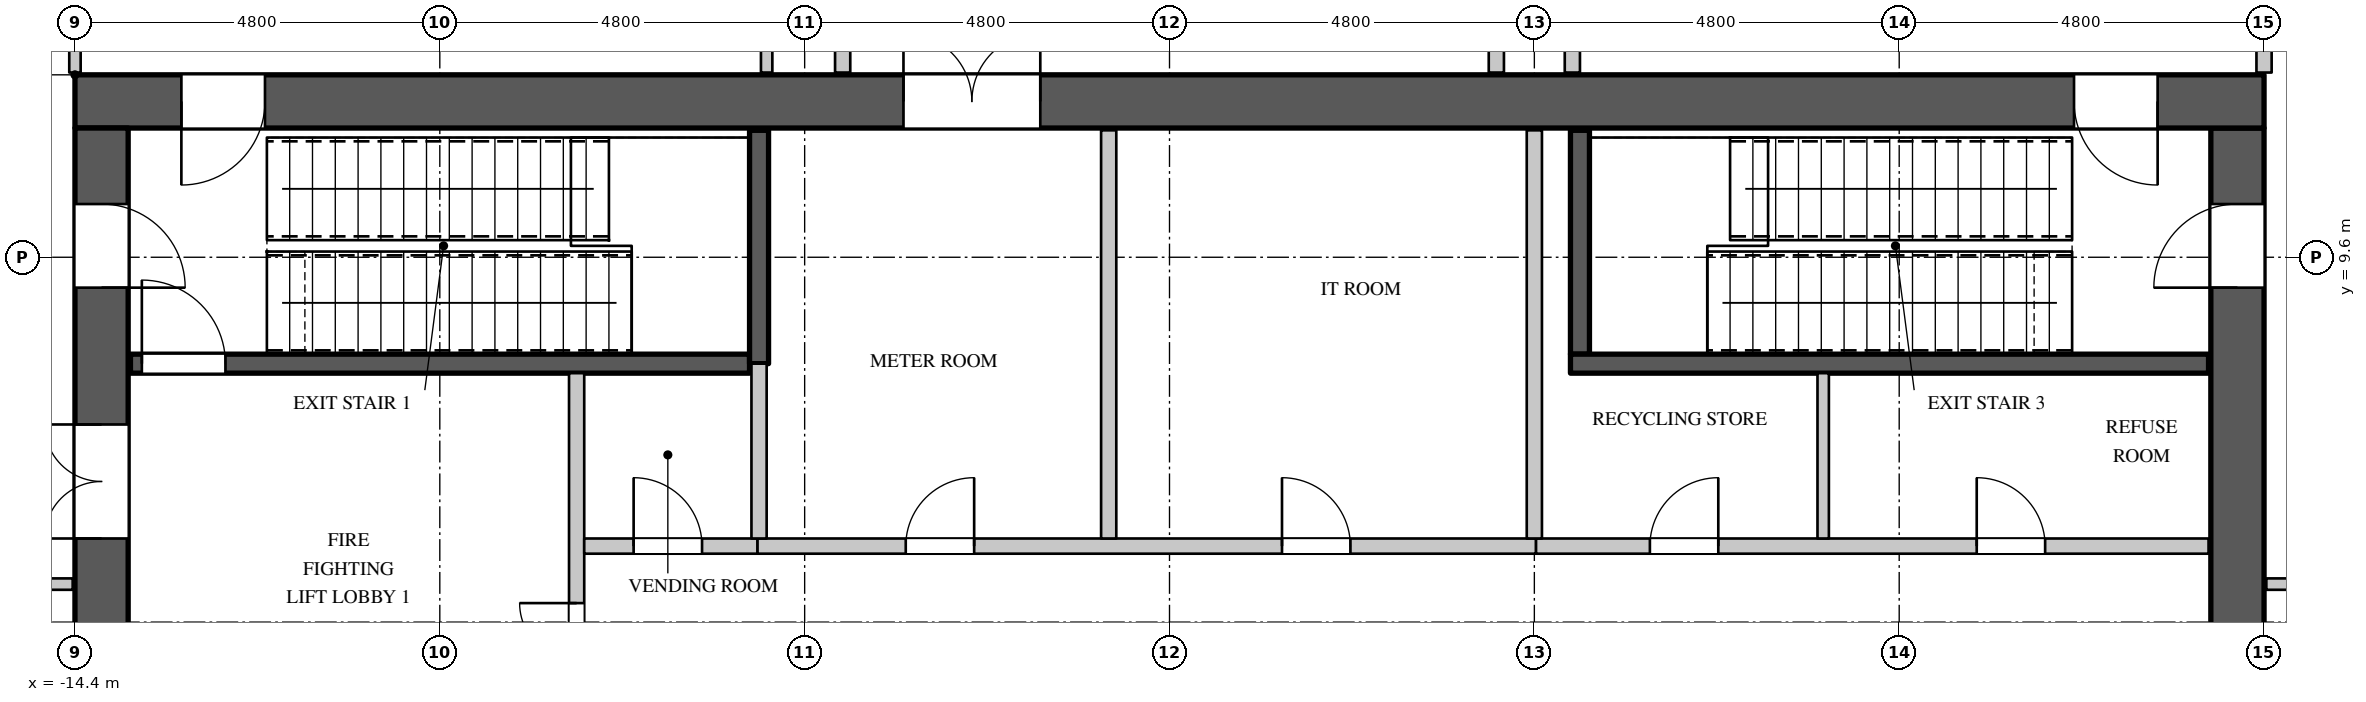
"""IFC4 building model, lengths in metres.
Left out: names, types, materials, properties, quantities, classifications, styles, units other than length and angle.
Written with IfcOpenShell. Run it as: python <this file> out.ifc"""

import sys

from ifc_helpers import new_model, si_unit, direction, frame, frame_2d, origin, place, context, subcontext, project, spatial, rectangle, extrude, element, fill, save


model = new_model("IFC4")
c1 = context("Model", 3, precision=1e-05, world=origin(), true_north=direction((0.0, 1.0)))
c2 = subcontext(c1, "Body", "Model", "MODEL_VIEW")
j1 = project(units=[si_unit("LENGTHUNIT", "METRE"), si_unit("PLANEANGLEUNIT", "RADIAN")], contexts=[c1])
p1 = place(None, origin())
s1 = spatial("IfcSite", under=j1, at=p1, CompositionType="ELEMENT")
p2 = place(p1, origin())
s2 = spatial("IfcBuilding", under=s1, at=p2, CompositionType="ELEMENT")
p3 = place(p2, frame((0.0, 0.0, 208.5)))
s3 = spatial("IfcBuildingStorey", under=s2, at=p3, CompositionType="ELEMENT", Elevation=208.5)
p4 = place(p3, frame((-14.4, 11.65, 0.0), z_axis=(0.0, 0.0, 1.0), x_axis=(1.0, 0.0, 0.0)))
e1 = element("IfcWall", 1, at=p4, inside=s3, PredefinedType="SHEAR", context=c2, shape_type="SweptSolid", body=[
    extrude(rectangle(XDim=28.8, YDim=0.7, at=frame_2d((14.4, 0.0))), origin(), (0.0, 0.0, 1.0), 5.4),
])
p5 = place(p4, frame((1.4, 0.0, 0.0)))
e2 = element("IfcOpeningElement", 2, at=p5, cuts=e1, PredefinedType="OPENING", context=c2, shape_type="SweptSolid", body=[
    extrude(rectangle(XDim=1.1, YDim=2.2, at=frame_2d((0.55, 1.1))), frame((0.0, 0.36, 0.0), z_axis=(0.0, -1.0, 0.0), x_axis=(1.0, 0.0, 0.0)), (0.0, 0.0, 1.0), 0.72),
])
p6 = place(p4, frame((26.3, 0.0, 0.0)))
e3 = element("IfcOpeningElement", 3, at=p6, cuts=e1, PredefinedType="OPENING", context=c2, shape_type="SweptSolid", body=[
    extrude(rectangle(XDim=1.1, YDim=2.2, at=frame_2d((0.55, 1.1))), frame((0.0, 0.36, 0.0), z_axis=(0.0, -1.0, 0.0), x_axis=(1.0, 0.0, 0.0)), (0.0, 0.0, 1.0), 0.72),
])
p7 = place(p4, frame((10.9, 0.0, 0.0)))
e4 = element("IfcOpeningElement", 4, at=p7, cuts=e1, PredefinedType="OPENING", context=c2, shape_type="SweptSolid", body=[
    extrude(rectangle(XDim=1.8, YDim=2.4, at=frame_2d((0.9, 1.2))), frame((0.0, 0.36, 0.0), z_axis=(0.0, -1.0, 0.0), x_axis=(1.0, 0.0, 0.0)), (0.0, 0.0, 1.0), 0.72),
])
p8 = place(p3, frame((14.05, -11.3, 0.0), z_axis=(0.0, 0.0, 1.0), x_axis=(0.0, 1.0, 0.0)))
e5 = element("IfcWall", 5, at=p8, inside=s3, PredefinedType="SHEAR", context=c2, shape_type="SweptSolid", body=[
    extrude(rectangle(XDim=22.6, YDim=0.7, at=frame_2d((11.3, 0.0))), origin(), (0.0, 0.0, 1.0), 5.4),
])
p9 = place(p8, frame((20.5, 0.0, 0.0)))
e6 = element("IfcOpeningElement", 6, at=p9, cuts=e5, PredefinedType="OPENING", context=c2, shape_type="SweptSolid", body=[
    extrude(rectangle(XDim=1.1, YDim=2.2, at=frame_2d((0.55, 1.1))), frame((0.0, 0.36, 0.0), z_axis=(0.0, -1.0, 0.0), x_axis=(1.0, 0.0, 0.0)), (0.0, 0.0, 1.0), 0.72),
])
p10 = place(p8, frame((7.25, 0.0, 0.0)))
e7 = element("IfcOpeningElement", 7, at=p10, cuts=e5, PredefinedType="OPENING", context=c2, shape_type="SweptSolid", body=[
    extrude(rectangle(XDim=0.9, YDim=2.2, at=frame_2d((0.45, 1.1))), frame((0.0, 0.36, 0.0), z_axis=(0.0, -1.0, 0.0), x_axis=(1.0, 0.0, 0.0)), (0.0, 0.0, 1.0), 0.72),
])
p11 = place(p8, frame((1.0, 0.0, 0.0)))
e8 = element("IfcOpeningElement", 8, at=p11, cuts=e5, PredefinedType="OPENING", context=c2, shape_type="SweptSolid", body=[
    extrude(rectangle(XDim=1.1, YDim=2.2, at=frame_2d((0.55, 1.1))), frame((0.0, 0.36, 0.0), z_axis=(0.0, -1.0, 0.0), x_axis=(1.0, 0.0, 0.0)), (0.0, 0.0, 1.0), 0.72),
])
p12 = place(p8, frame((3.8, 0.0, 0.0)))
e9 = element("IfcOpeningElement", 9, at=p12, cuts=e5, PredefinedType="OPENING", context=c2, shape_type="SweptSolid", body=[
    extrude(rectangle(XDim=0.9, YDim=2.2, at=frame_2d((0.45, 1.1))), frame((0.0, 0.36, 0.0), z_axis=(0.0, -1.0, 0.0), x_axis=(1.0, 0.0, 0.0)), (0.0, 0.0, 1.0), 0.72),
])
p13 = place(p3, frame((-14.05, -11.3, 0.0), z_axis=(0.0, 0.0, 1.0), x_axis=(0.0, 1.0, 0.0)))
e10 = element("IfcWall", 10, at=p13, inside=s3, PredefinedType="SHEAR", context=c2, shape_type="SweptSolid", body=[
    extrude(rectangle(XDim=22.6, YDim=0.7, at=frame_2d((11.3, 0.0))), origin(), (0.0, 0.0, 1.0), 5.4),
])
p14 = place(p13, frame((17.2, 0.0, 0.0)))
e11 = element("IfcOpeningElement", 11, at=p14, cuts=e10, PredefinedType="OPENING", context=c2, shape_type="SweptSolid", body=[
    extrude(rectangle(XDim=1.5, YDim=2.4, at=frame_2d((0.75, 1.2))), frame((0.0, 0.36, 0.0), z_axis=(0.0, -1.0, 0.0), x_axis=(1.0, 0.0, 0.0)), (0.0, 0.0, 1.0), 0.72),
])
p15 = place(p13, frame((20.5, 0.0, 0.0)))
e12 = element("IfcOpeningElement", 12, at=p15, cuts=e10, PredefinedType="OPENING", context=c2, shape_type="SweptSolid", body=[
    extrude(rectangle(XDim=1.1, YDim=2.2, at=frame_2d((0.55, 1.1))), frame((0.0, 0.36, 0.0), z_axis=(0.0, -1.0, 0.0), x_axis=(1.0, 0.0, 0.0)), (0.0, 0.0, 1.0), 0.72),
])
p16 = place(p13, frame((14.45, 0.0, 0.0)))
e13 = element("IfcOpeningElement", 13, at=p16, cuts=e10, PredefinedType="OPENING", context=c2, shape_type="SweptSolid", body=[
    extrude(rectangle(XDim=0.9, YDim=2.2, at=frame_2d((0.45, 1.1))), frame((0.0, 0.36, 0.0), z_axis=(0.0, -1.0, 0.0), x_axis=(1.0, 0.0, 0.0)), (0.0, 0.0, 1.0), 0.72),
])
p17 = place(p13, frame((3.85, 0.0, 0.0)))
e14 = element("IfcOpeningElement", 14, at=p17, cuts=e10, PredefinedType="OPENING", context=c2, shape_type="SweptSolid", body=[
    extrude(rectangle(XDim=1.5, YDim=2.4, at=frame_2d((0.75, 1.2))), frame((0.0, 0.36, 0.0), z_axis=(0.0, -1.0, 0.0), x_axis=(1.0, 0.0, 0.0)), (0.0, 0.0, 1.0), 0.72),
])
p18 = place(p13, frame((1.0, 0.0, 0.0)))
e15 = element("IfcOpeningElement", 15, at=p18, cuts=e10, PredefinedType="OPENING", context=c2, shape_type="SweptSolid", body=[
    extrude(rectangle(XDim=1.1, YDim=2.2, at=frame_2d((0.55, 1.1))), frame((0.0, 0.36, 0.0), z_axis=(0.0, -1.0, 0.0), x_axis=(1.0, 0.0, 0.0)), (0.0, 0.0, 1.0), 0.72),
])
p19 = place(p3, frame((-7.8, 2.8, 0.0), z_axis=(0.0, 0.0, 1.0), x_axis=(0.0, 1.0, 0.0)))
e16 = element("IfcWall", 16, at=p19, inside=s3, PredefinedType="PARTITIONING", context=c2, shape_type="SweptSolid", body=[
    extrude(rectangle(XDim=5.275, YDim=0.2, at=frame_2d((2.637, 0.0))), origin(), (0.0, 0.0, 1.0), 5.15),
])
p20 = place(p19, frame((0.75, 0.0, 0.0)))
e17 = element("IfcOpeningElement", 17, at=p20, cuts=e16, PredefinedType="OPENING", context=c2, shape_type="SweptSolid", body=[
    extrude(rectangle(XDim=1.5, YDim=2.4, at=frame_2d((0.75, 1.2))), frame((0.0, 0.11, 0.0), z_axis=(0.0, -1.0, 0.0), x_axis=(1.0, 0.0, 0.0)), (0.0, 0.0, 1.0), 0.22),
])
p21 = place(p3, frame((-7.7, 5.8, 0.0), z_axis=(0.0, 0.0, 1.0), x_axis=(1.0, 0.0, 0.0)))
e18 = element("IfcWall", 18, at=p21, inside=s3, PredefinedType="PARTITIONING", context=c2, shape_type="SweptSolid", body=[
    extrude(rectangle(XDim=2.28, YDim=0.2, at=frame_2d((1.14, 0.0))), origin(), (0.0, 0.0, 1.0), 5.15),
])
p22 = place(p21, frame((0.65, 0.0, 0.0)))
e19 = element("IfcOpeningElement", 19, at=p22, cuts=e18, PredefinedType="OPENING", context=c2, shape_type="SweptSolid", body=[
    extrude(rectangle(XDim=0.9, YDim=2.2, at=frame_2d((0.45, 1.1))), frame((0.0, 0.11, 0.0), z_axis=(0.0, -1.0, 0.0), x_axis=(1.0, 0.0, 0.0)), (0.0, 0.0, 1.0), 0.22),
])
p23 = place(p3, frame((4.82, 5.8, 0.0), z_axis=(0.0, 0.0, 1.0), x_axis=(1.0, 0.0, 0.0)))
e20 = element("IfcWall", 20, at=p23, inside=s3, PredefinedType="PARTITIONING", context=c2, shape_type="SweptSolid", body=[
    extrude(rectangle(XDim=8.85, YDim=0.2, at=frame_2d((4.425, 0.0))), origin(), (0.0, 0.0, 1.0), 5.15),
])
p24 = place(p23, frame((1.5, 0.0, 0.0)))
e21 = element("IfcOpeningElement", 21, at=p24, cuts=e20, PredefinedType="OPENING", context=c2, shape_type="SweptSolid", body=[
    extrude(rectangle(XDim=0.9, YDim=2.2, at=frame_2d((0.45, 1.1))), frame((0.0, 0.11, 0.0), z_axis=(0.0, -1.0, 0.0), x_axis=(1.0, 0.0, 0.0)), (0.0, 0.0, 1.0), 0.22),
])
p25 = place(p23, frame((5.8, 0.0, 0.0)))
e22 = element("IfcOpeningElement", 22, at=p25, cuts=e20, PredefinedType="OPENING", context=c2, shape_type="SweptSolid", body=[
    extrude(rectangle(XDim=0.9, YDim=2.2, at=frame_2d((0.45, 1.1))), frame((0.0, 0.11, 0.0), z_axis=(0.0, -1.0, 0.0), x_axis=(1.0, 0.0, 0.0)), (0.0, 0.0, 1.0), 0.22),
])
p26 = place(p3, frame((-24.055, 5.3, 0.0), z_axis=(0.0, 0.0, 1.0), x_axis=(1.0, 0.0, 0.0)))
e23 = element("IfcWall", 23, at=p26, inside=s3, PredefinedType="PARTITIONING", context=c2, shape_type="SweptSolid", body=[
    extrude(rectangle(XDim=9.625, YDim=0.15, at=frame_2d((4.812, 0.0))), origin(), (0.0, 0.0, 1.0), 5.15),
])
p27 = place(p3, frame((-14.4, 12.03, 0.0), z_axis=(0.0, 0.0, 1.0), x_axis=(0.0, 1.0, 0.0)))
e24 = element("IfcWall", 24, at=p27, inside=s3, PredefinedType="PARTITIONING", context=c2, shape_type="SweptSolid", body=[
    extrude(rectangle(XDim=10.06, YDim=0.15, at=frame_2d((5.03, 0.0))), origin(), (0.0, 0.0, 1.0), 5.15),
])
p28 = place(p3, frame((-5.3, 12.03, 0.0), z_axis=(0.0, 0.0, 1.0), x_axis=(0.0, 1.0, 0.0)))
e25 = element("IfcWall", 25, at=p28, inside=s3, PredefinedType="PARTITIONING", context=c2, shape_type="SweptSolid", body=[
    extrude(rectangle(XDim=12.025, YDim=0.15, at=frame_2d((6.012, 0.0))), origin(), (0.0, 0.0, 1.0), 5.15),
])
p29 = place(p3, frame((8.6, 5.9, 0.0), z_axis=(0.0, 0.0, 1.0), x_axis=(0.0, 1.0, 0.0)))
e26 = element("IfcWall", 26, at=p29, inside=s3, PredefinedType="PARTITIONING", context=c2, shape_type="SweptSolid", body=[
    extrude(rectangle(XDim=2.175, YDim=0.15, at=frame_2d((1.087, 0.0))), origin(), (0.0, 0.0, 1.0), 5.15),
])
p30 = place(p3, frame((14.43, 5.3, 0.0), z_axis=(0.0, 0.0, 1.0), x_axis=(1.0, 0.0, 0.0)))
e27 = element("IfcWall", 27, at=p30, inside=s3, PredefinedType="PARTITIONING", context=c2, shape_type="SweptSolid", body=[
    extrude(rectangle(XDim=9.625, YDim=0.15, at=frame_2d((4.812, 0.0))), origin(), (0.0, 0.0, 1.0), 5.15),
])
p31 = place(p3, frame((-5.42, 5.8, 0.0), z_axis=(0.0, 0.0, 1.0), x_axis=(1.0, 0.0, 0.0)))
e28 = element("IfcWall", 28, at=p31, inside=s3, PredefinedType="PARTITIONING", context=c2, shape_type="SweptSolid", body=[
    extrude(rectangle(XDim=10.24, YDim=0.2, at=frame_2d((5.12, 0.0))), origin(), (0.0, 0.0, 1.0), 5.15),
])
p32 = place(p31, frame((1.95, 0.0, 0.0)))
e29 = element("IfcOpeningElement", 29, at=p32, cuts=e28, PredefinedType="OPENING", context=c2, shape_type="SweptSolid", body=[
    extrude(rectangle(XDim=0.9, YDim=2.2, at=frame_2d((0.45, 1.1))), frame((0.0, 0.11, 0.0), z_axis=(0.0, -1.0, 0.0), x_axis=(1.0, 0.0, 0.0)), (0.0, 0.0, 1.0), 0.22),
])
p33 = place(p31, frame((6.9, 0.0, 0.0)))
e30 = element("IfcOpeningElement", 30, at=p33, cuts=e28, PredefinedType="OPENING", context=c2, shape_type="SweptSolid", body=[
    extrude(rectangle(XDim=0.9, YDim=2.2, at=frame_2d((0.45, 1.1))), frame((0.0, 0.11, 0.0), z_axis=(0.0, -1.0, 0.0), x_axis=(1.0, 0.0, 0.0)), (0.0, 0.0, 1.0), 0.22),
])
p34 = place(p3, frame((-5.4, 5.9, 0.0), z_axis=(0.0, 0.0, 1.0), x_axis=(0.0, 1.0, 0.0)))
e31 = element("IfcWall", 31, at=p34, inside=s3, PredefinedType="PARTITIONING", context=c2, shape_type="SweptSolid", body=[
    extrude(rectangle(XDim=2.3, YDim=0.2, at=frame_2d((1.15, 0.0))), origin(), (0.0, 0.0, 1.0), 5.15),
])
p35 = place(p3, frame((-4.3, 12.03, 0.0), z_axis=(0.0, 0.0, 1.0), x_axis=(0.0, 1.0, 0.0)))
e32 = element("IfcWall", 32, at=p35, inside=s3, PredefinedType="PARTITIONING", context=c2, shape_type="SweptSolid", body=[
    extrude(rectangle(XDim=7.842, YDim=0.2, at=frame_2d((3.921, 0.0))), origin(), (0.0, 0.0, 1.0), 5.15),
])
p36 = place(p3, frame((-0.8, 5.9, 0.0), z_axis=(0.0, 0.0, 1.0), x_axis=(0.0, 1.0, 0.0)))
e33 = element("IfcWall", 33, at=p36, inside=s3, PredefinedType="PARTITIONING", context=c2, shape_type="SweptSolid", body=[
    extrude(rectangle(XDim=5.37, YDim=0.2, at=frame_2d((2.685, 0.0))), origin(), (0.0, 0.0, 1.0), 5.15),
])
p37 = place(p3, frame((4.3, 12.03, 0.0), z_axis=(0.0, 0.0, 1.0), x_axis=(0.0, 1.0, 0.0)))
e34 = element("IfcWall", 34, at=p37, inside=s3, PredefinedType="PARTITIONING", context=c2, shape_type="SweptSolid", body=[
    extrude(rectangle(XDim=7.842, YDim=0.2, at=frame_2d((3.921, 0.0))), origin(), (0.0, 0.0, 1.0), 5.15),
])
p38 = place(p3, frame((4.8, 5.9, 0.0), z_axis=(0.0, 0.0, 1.0), x_axis=(0.0, 1.0, 0.0)))
e35 = element("IfcWall", 35, at=p38, inside=s3, PredefinedType="PARTITIONING", context=c2, shape_type="SweptSolid", body=[
    extrude(rectangle(XDim=5.37, YDim=0.2, at=frame_2d((2.685, 0.0))), origin(), (0.0, 0.0, 1.0), 5.15),
])
p39 = place(p3, frame((5.3, 12.03, 0.0), z_axis=(0.0, 0.0, 1.0), x_axis=(0.0, 1.0, 0.0)))
e36 = element("IfcWall", 36, at=p39, inside=s3, PredefinedType="PARTITIONING", context=c2, shape_type="SweptSolid", body=[
    extrude(rectangle(XDim=12.025, YDim=0.2, at=frame_2d((6.012, 0.0))), origin(), (0.0, 0.0, 1.0), 5.15),
])
p40 = place(p3, frame((14.4, 12.03, 0.0), z_axis=(0.0, 0.0, 1.0), x_axis=(0.0, 1.0, 0.0)))
e37 = element("IfcWall", 37, at=p40, inside=s3, PredefinedType="PARTITIONING", context=c2, shape_type="SweptSolid", body=[
    extrude(rectangle(XDim=10.06, YDim=0.2, at=frame_2d((5.03, 0.0))), origin(), (0.0, 0.0, 1.0), 5.15),
])
p41 = place(p40, frame((0.95, 0.0, 0.0)))
e38 = element("IfcOpeningElement", 38, at=p41, cuts=e37, PredefinedType="OPENING", context=c2, shape_type="SweptSolid", body=[
    extrude(rectangle(XDim=1.8, YDim=2.4, at=frame_2d((0.9, 1.2))), frame((0.0, 0.11, 0.0), z_axis=(0.0, -1.0, 0.0), x_axis=(1.0, 0.0, 0.0)), (0.0, 0.0, 1.0), 0.22),
])
p42 = place(p3, frame((-13.67, 8.2, 0.0), z_axis=(0.0, 0.0, 1.0), x_axis=(1.0, 0.0, 0.0)))
e39 = element("IfcWall", 39, at=p42, inside=s3, PredefinedType="SHEAR", context=c2, shape_type="SweptSolid", body=[
    extrude(rectangle(XDim=8.145, YDim=0.25, at=frame_2d((4.073, 0.0))), origin(), (0.0, 0.0, 1.0), 5.15),
])
p43 = place(p42, frame((0.15, 0.0, 0.0)))
e40 = element("IfcOpeningElement", 40, at=p43, cuts=e39, PredefinedType="OPENING", context=c2, shape_type="SweptSolid", body=[
    extrude(rectangle(XDim=1.1, YDim=2.2, at=frame_2d((0.55, 1.1))), frame((0.0, 0.135, 0.0), z_axis=(0.0, -1.0, 0.0), x_axis=(1.0, 0.0, 0.0)), (0.0, 0.0, 1.0), 0.27),
])
p44 = place(p3, frame((-5.4, 8.2, 0.0), z_axis=(0.0, 0.0, 1.0), x_axis=(0.0, 1.0, 0.0)))
e41 = element("IfcWall", 41, at=p44, inside=s3, PredefinedType="SHEAR", context=c2, shape_type="SweptSolid", body=[
    extrude(rectangle(XDim=3.07, YDim=0.25, at=frame_2d((1.535, 0.0))), origin(), (0.0, 0.0, 1.0), 5.15),
])
p45 = place(p3, frame((5.4, 8.325, 0.0), z_axis=(0.0, 0.0, 1.0), x_axis=(0.0, 1.0, 0.0)))
e42 = element("IfcWall", 42, at=p45, inside=s3, PredefinedType="SHEAR", context=c2, shape_type="SweptSolid", body=[
    extrude(rectangle(XDim=2.945, YDim=0.25, at=frame_2d((1.473, 0.0))), origin(), (0.0, 0.0, 1.0), 5.15),
])
p46 = place(p3, frame((5.275, 8.2, 0.0), z_axis=(0.0, 0.0, 1.0), x_axis=(1.0, 0.0, 0.0)))
e43 = element("IfcWall", 43, at=p46, inside=s3, PredefinedType="SHEAR", context=c2, shape_type="SweptSolid", body=[
    extrude(rectangle(XDim=8.395, YDim=0.25, at=frame_2d((4.198, 0.0))), origin(), (0.0, 0.0, 1.0), 5.15),
])
p47 = place(p22, origin())
e44 = element("IfcDoor", 44, at=p47, inside=s3, OperationType="SINGLE_SWING_LEFT", PredefinedType="DOOR", context=c2, shape_type="SweptSolid", body=[
    extrude(rectangle(XDim=0.9, YDim=2.2, at=frame_2d((0.45, 1.1))), frame((0.0, 0.025, 0.0), z_axis=(0.0, -1.0, 0.0), x_axis=(1.0, 0.0, 0.0)), (0.0, 0.0, 1.0), 0.05),
])
fill(e19, e44)
p48 = place(p32, origin())
e45 = element("IfcDoor", 45, at=p48, inside=s3, OperationType="SINGLE_SWING_RIGHT", PredefinedType="DOOR", context=c2, shape_type="SweptSolid", body=[
    extrude(rectangle(XDim=0.9, YDim=2.2, at=frame_2d((0.45, 1.1))), frame((0.0, 0.025, 0.0), z_axis=(0.0, -1.0, 0.0), x_axis=(1.0, 0.0, 0.0)), (0.0, 0.0, 1.0), 0.05),
])
fill(e29, e45)
p49 = place(p33, origin())
e46 = element("IfcDoor", 46, at=p49, inside=s3, OperationType="SINGLE_SWING_LEFT", PredefinedType="DOOR", context=c2, shape_type="SweptSolid", body=[
    extrude(rectangle(XDim=0.9, YDim=2.2, at=frame_2d((0.45, 1.1))), frame((0.0, 0.025, 0.0), z_axis=(0.0, -1.0, 0.0), x_axis=(1.0, 0.0, 0.0)), (0.0, 0.0, 1.0), 0.05),
])
fill(e30, e46)
p50 = place(p24, origin())
e47 = element("IfcDoor", 47, at=p50, inside=s3, OperationType="SINGLE_SWING_RIGHT", PredefinedType="DOOR", context=c2, shape_type="SweptSolid", body=[
    extrude(rectangle(XDim=0.9, YDim=2.2, at=frame_2d((0.45, 1.1))), frame((0.0, 0.025, 0.0), z_axis=(0.0, -1.0, 0.0), x_axis=(1.0, 0.0, 0.0)), (0.0, 0.0, 1.0), 0.05),
])
fill(e21, e47)
p51 = place(p25, origin())
e48 = element("IfcDoor", 48, at=p51, inside=s3, OperationType="SINGLE_SWING_LEFT", PredefinedType="DOOR", context=c2, shape_type="SweptSolid", body=[
    extrude(rectangle(XDim=0.9, YDim=2.2, at=frame_2d((0.45, 1.1))), frame((0.0, 0.025, 0.0), z_axis=(0.0, -1.0, 0.0), x_axis=(1.0, 0.0, 0.0)), (0.0, 0.0, 1.0), 0.05),
])
fill(e22, e48)
p52 = place(p43, origin())
e49 = element("IfcDoor", 49, at=p52, inside=s3, OperationType="SINGLE_SWING_LEFT", PredefinedType="DOOR", context=c2, shape_type="SweptSolid", body=[
    extrude(rectangle(XDim=1.1, YDim=2.2, at=frame_2d((0.55, 1.1))), frame((0.0, 0.025, 0.0), z_axis=(0.0, -1.0, 0.0), x_axis=(1.0, 0.0, 0.0)), (0.0, 0.0, 1.0), 0.05),
])
fill(e40, e49)
p53 = place(p20, origin())
e50 = element("IfcDoor", 50, at=p53, inside=s3, OperationType="DOUBLE_DOOR_SINGLE_SWING", PredefinedType="DOOR", context=c2, shape_type="SweptSolid", body=[
    extrude(rectangle(XDim=1.5, YDim=2.4, at=frame_2d((0.75, 1.2))), frame((0.0, 0.025, 0.0), z_axis=(0.0, -1.0, 0.0), x_axis=(1.0, 0.0, 0.0)), (0.0, 0.0, 1.0), 0.05),
])
fill(e17, e50)
p54 = place(p5, origin())
e51 = element("IfcDoor", 51, at=p54, inside=s3, OperationType="SINGLE_SWING_RIGHT", PredefinedType="DOOR", context=c2, shape_type="SweptSolid", body=[
    extrude(rectangle(XDim=1.1, YDim=2.2, at=frame_2d((0.55, 1.1))), frame((0.0, -0.295, 0.0), z_axis=(0.0, -1.0, 0.0), x_axis=(1.0, 0.0, 0.0)), (0.0, 0.0, 1.0), 0.05),
])
fill(e2, e51)
p55 = place(p6, origin())
e52 = element("IfcDoor", 52, at=p55, inside=s3, OperationType="SINGLE_SWING_LEFT", PredefinedType="DOOR", context=c2, shape_type="SweptSolid", body=[
    extrude(rectangle(XDim=1.1, YDim=2.2, at=frame_2d((0.55, 1.1))), frame((0.0, -0.295, 0.0), z_axis=(0.0, -1.0, 0.0), x_axis=(1.0, 0.0, 0.0)), (0.0, 0.0, 1.0), 0.05),
])
fill(e3, e52)
p56 = place(p7, origin())
e53 = element("IfcDoor", 53, at=p56, inside=s3, OperationType="DOUBLE_DOOR_SINGLE_SWING", PredefinedType="DOOR", context=c2, shape_type="SweptSolid", body=[
    extrude(rectangle(XDim=1.8, YDim=2.4, at=frame_2d((0.9, 1.2))), frame((0.0, 0.345, 0.0), z_axis=(0.0, -1.0, 0.0), x_axis=(1.0, 0.0, 0.0)), (0.0, 0.0, 1.0), 0.05),
])
fill(e4, e53)
p57 = place(p9, origin())
e54 = element("IfcDoor", 54, at=p57, inside=s3, OperationType="SINGLE_SWING_LEFT", PredefinedType="DOOR", context=c2, shape_type="SweptSolid", body=[
    extrude(rectangle(XDim=1.1, YDim=2.2, at=frame_2d((0.55, 1.1))), frame((0.0, 0.345, 0.0), z_axis=(0.0, -1.0, 0.0), x_axis=(1.0, 0.0, 0.0)), (0.0, 0.0, 1.0), 0.05),
])
fill(e6, e54)
p58 = place(p14, origin())
e55 = element("IfcDoor", 55, at=p58, inside=s3, OperationType="DOUBLE_DOOR_SINGLE_SWING", PredefinedType="DOOR", context=c2, shape_type="SweptSolid", body=[
    extrude(rectangle(XDim=1.5, YDim=2.4, at=frame_2d((0.75, 1.2))), frame((0.0, 0.345, 0.0), z_axis=(0.0, -1.0, 0.0), x_axis=(1.0, 0.0, 0.0)), (0.0, 0.0, 1.0), 0.05),
])
fill(e11, e55)
p59 = place(p15, origin())
e56 = element("IfcDoor", 56, at=p59, inside=s3, OperationType="SINGLE_SWING_RIGHT", PredefinedType="DOOR", context=c2, shape_type="SweptSolid", body=[
    extrude(rectangle(XDim=1.1, YDim=2.2, at=frame_2d((0.55, 1.1))), frame((0.0, -0.295, 0.0), z_axis=(0.0, -1.0, 0.0), x_axis=(1.0, 0.0, 0.0)), (0.0, 0.0, 1.0), 0.05),
])
fill(e12, e56)
save(model, sys.argv[1])
